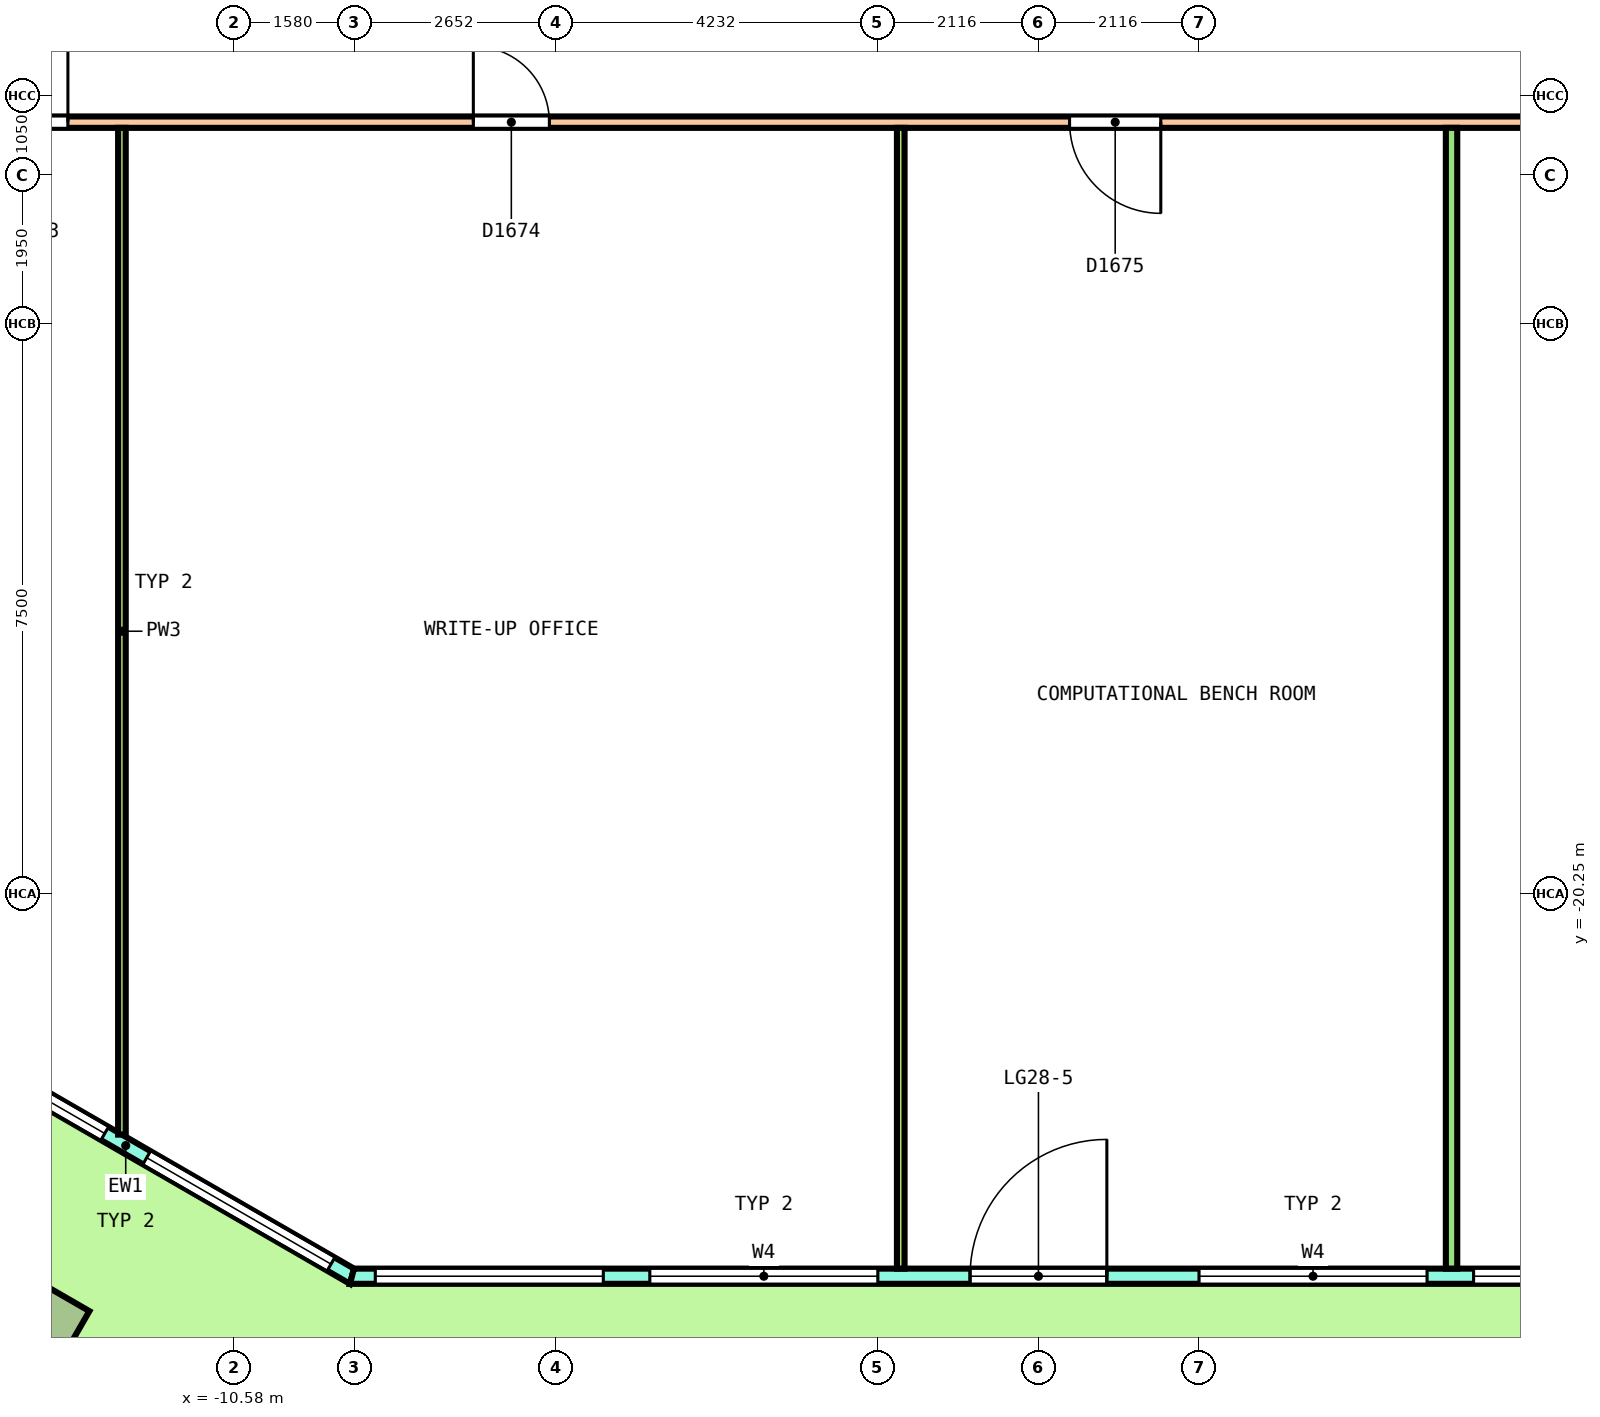
"""IFC4 building model, lengths in metres.
Left out: names, types, materials, properties, quantities, classifications, styles, units other than length and angle.
Written with IfcOpenShell. Run it as: python <this file> out.ifc"""

import sys

from ifc_helpers import new_model, si_unit, direction, frame, frame_2d, origin, origin_2d, place, context, subcontext, project, spatial, polyline, rectangle, outline, extrude, element, fill, save


model = new_model("IFC4")
c1 = context("Model", 3, precision=1e-05, world=origin(), true_north=direction((0.0, 1.0)))
c2 = subcontext(c1, "Body", "Model", "MODEL_VIEW")
j1 = project(units=[si_unit("LENGTHUNIT", "METRE"), si_unit("PLANEANGLEUNIT", "RADIAN")], contexts=[c1])
p1 = place(None, origin())
s1 = spatial("IfcSite", under=j1, at=p1, CompositionType="ELEMENT")
p2 = place(p1, origin())
s2 = spatial("IfcBuilding", under=s1, at=p2, CompositionType="ELEMENT")
p3 = place(p2, frame((0.0, 0.0, 130.8)))
s3 = spatial("IfcBuildingStorey", under=s2, at=p3, CompositionType="ELEMENT", Elevation=130.8)
p4 = place(p3, frame((-13.408, -25.989, 0.0), z_axis=(0.0, 0.0, 1.0), x_axis=(0.866025403784, -0.5, 0.0)))
e1 = element("IfcColumn", 1, at=p4, inside=s3, PredefinedType="COLUMN", context=c2, shape_type="SweptSolid", body=[
    extrude(rectangle(XDim=1.35, YDim=1.35, at=origin_2d()), origin(), (0.0, 0.0, 1.0), 4.04),
])
p5 = place(p3, frame((-14.985, -21.845, 0.0), z_axis=(0.0, 0.0, 1.0), x_axis=(0.866029458321, -0.49999297727, 0.0)))
e2 = element("IfcWall", 2, at=p5, inside=s3, PredefinedType="SOLIDWALL", context=c2, shape_type="SweptSolid", body=[
    extrude(outline(polyline([(-0.027, -0.1), (1.128, -0.1), (2.282, -0.1), (3.437, -0.1), (4.592, -0.1), (5.747, -0.1), (6.901, -0.1), (6.848, 0.1), (5.711, 0.1), (4.574, 0.1), (3.437, 0.1), (2.301, 0.1), (1.164, 0.1), (0.027, 0.1), (-0.027, -0.1)])), origin(), (0.0, 0.0, 1.0), 4.1),
])
p6 = place(p5, frame((0.319, 0.0, 0.1)))
e3 = element("IfcOpeningElement", 3, at=p6, cuts=e2, PredefinedType="OPENING", context=c2, shape_type="SweptSolid", body=[
    extrude(rectangle(XDim=2.8, YDim=2.9, at=frame_2d((1.4, 1.45))), frame((0.0, 0.11, 0.0), z_axis=(0.0, -1.0, 0.0), x_axis=(1.0, 0.0, 0.0)), (0.0, 0.0, 1.0), 0.22),
])
p7 = place(p5, frame((3.756, 0.0, 0.1)))
e4 = element("IfcOpeningElement", 4, at=p7, cuts=e2, PredefinedType="OPENING", context=c2, shape_type="SweptSolid", body=[
    extrude(rectangle(XDim=2.8, YDim=2.9, at=frame_2d((1.4, 1.45))), frame((0.0, 0.11, 0.0), z_axis=(0.0, -1.0, 0.0), x_axis=(1.0, 0.0, 0.0)), (0.0, 0.0, 1.0), 0.22),
])
p8 = place(p3, frame((-9.031, -25.283, 0.0), z_axis=(0.0, 0.0, 1.0), x_axis=(1.0, 0.0, 0.0)))
e5 = element("IfcWall", 5, at=p8, inside=s3, PredefinedType="SOLIDWALL", context=c2, shape_type="SweptSolid", body=[
    extrude(outline(polyline([(-0.027, -0.1), (0.979, -0.1), (1.986, -0.1), (2.992, -0.1), (3.999, -0.1), (5.005, -0.1), (6.012, -0.1), (7.018, -0.1), (8.025, -0.1), (9.031, -0.1), (10.038, -0.1), (11.044, -0.1), (12.051, -0.1), (13.057, -0.1), (14.063, -0.1), (15.07, -0.1), (16.076, -0.1), (17.083, -0.1), (18.089, -0.1), (18.036, 0.1), (17.035, 0.1), (16.035, 0.1), (15.034, 0.1), (14.034, 0.1), (13.033, 0.1), (12.033, 0.1), (11.032, 0.1), (10.032, 0.1), (9.031, 0.1), (8.031, 0.1), (7.03, 0.1), (6.03, 0.1), (5.029, 0.1), (4.029, 0.1), (3.028, 0.1), (2.028, 0.1), (1.027, 0.1), (0.027, 0.1), (-0.027, -0.1)])), origin(), (0.0, 0.0, 1.0), 4.1),
])
p9 = place(p8, frame((0.306, 0.0, 0.1)))
e6 = element("IfcOpeningElement", 6, at=p9, cuts=e5, PredefinedType="OPENING", context=c2, shape_type="SweptSolid", body=[
    extrude(rectangle(XDim=3.0, YDim=2.9, at=frame_2d((1.5, 1.45))), frame((0.0, 0.11, 0.0), z_axis=(0.0, -1.0, 0.0), x_axis=(1.0, 0.0, 0.0)), (0.0, 0.0, 1.0), 0.22),
])
p10 = place(p8, frame((3.919, 0.0, 0.1)))
e7 = element("IfcOpeningElement", 7, at=p10, cuts=e5, PredefinedType="OPENING", context=c2, shape_type="SweptSolid", body=[
    extrude(rectangle(XDim=3.0, YDim=2.9, at=frame_2d((1.5, 1.45))), frame((0.0, 0.11, 0.0), z_axis=(0.0, -1.0, 0.0), x_axis=(1.0, 0.0, 0.0)), (0.0, 0.0, 1.0), 0.22),
])
p11 = place(p8, frame((8.131, 0.0, 0.0)))
e8 = element("IfcOpeningElement", 8, at=p11, cuts=e5, PredefinedType="OPENING", context=c2, shape_type="SweptSolid", body=[
    extrude(rectangle(XDim=1.8, YDim=2.4, at=frame_2d((0.9, 1.2))), frame((0.0, 0.11, 0.0), z_axis=(0.0, -1.0, 0.0), x_axis=(1.0, 0.0, 0.0)), (0.0, 0.0, 1.0), 0.22),
])
p12 = place(p8, frame((8.131, 0.0, 2.55)))
e9 = element("IfcOpeningElement", 9, at=p12, cuts=e5, PredefinedType="OPENING", context=c2, shape_type="SweptSolid", body=[
    extrude(rectangle(XDim=1.8, YDim=0.45, at=frame_2d((0.9, 0.225))), frame((0.0, 0.11, 0.0), z_axis=(0.0, -1.0, 0.0), x_axis=(1.0, 0.0, 0.0)), (0.0, 0.0, 1.0), 0.22),
])
p13 = place(p8, frame((11.144, 0.0, 0.1)))
e10 = element("IfcOpeningElement", 10, at=p13, cuts=e5, PredefinedType="OPENING", context=c2, shape_type="SweptSolid", body=[
    extrude(rectangle(XDim=3.0, YDim=2.9, at=frame_2d((1.5, 1.45))), frame((0.0, 0.11, 0.0), z_axis=(0.0, -1.0, 0.0), x_axis=(1.0, 0.0, 0.0)), (0.0, 0.0, 1.0), 0.22),
])
p14 = place(p8, frame((14.756, 0.0, 0.1)))
e11 = element("IfcOpeningElement", 11, at=p14, cuts=e5, PredefinedType="OPENING", context=c2, shape_type="SweptSolid", body=[
    extrude(rectangle(XDim=3.0, YDim=2.9, at=frame_2d((1.5, 1.45))), frame((0.0, 0.11, 0.0), z_axis=(0.0, -1.0, 0.0), x_axis=(1.0, 0.0, 0.0)), (0.0, 0.0, 1.0), 0.22),
])
p15 = place(p3, frame((-15.275, -10.1, 0.0), z_axis=(0.0, 0.0, 1.0), x_axis=(1.0, 0.0, 0.0)))
e12 = element("IfcWall", 12, at=p15, inside=s3, PredefinedType="PARTITIONING", context=c2, shape_type="SweptSolid", body=[
    extrude(rectangle(XDim=30.4, YDim=0.15, at=frame_2d((15.2, 0.0))), origin(), (0.0, 0.0, 1.0), 3.05),
])
p16 = place(p15, frame((1.506, 0.0, 0.0)))
e13 = element("IfcOpeningElement", 13, at=p16, cuts=e12, PredefinedType="OPENING", context=c2, shape_type="SweptSolid", body=[
    extrude(rectangle(XDim=1.0, YDim=2.1, at=frame_2d((0.5, 1.05))), frame((0.0, 0.085, 0.0), z_axis=(0.0, -1.0, 0.0), x_axis=(1.0, 0.0, 0.0)), (0.0, 0.0, 1.0), 0.17),
])
p17 = place(p15, frame((7.84, 0.0, 0.0)))
e14 = element("IfcOpeningElement", 14, at=p17, cuts=e12, PredefinedType="OPENING", context=c2, shape_type="SweptSolid", body=[
    extrude(rectangle(XDim=1.0, YDim=2.1, at=frame_2d((0.5, 1.05))), frame((0.0, 0.085, 0.0), z_axis=(0.0, -1.0, 0.0), x_axis=(1.0, 0.0, 0.0)), (0.0, 0.0, 1.0), 0.17),
])
p18 = place(p15, frame((15.685, 0.0, 0.0)))
e15 = element("IfcOpeningElement", 15, at=p18, cuts=e12, PredefinedType="OPENING", context=c2, shape_type="SweptSolid", body=[
    extrude(rectangle(XDim=1.2, YDim=2.1, at=frame_2d((0.6, 1.05))), frame((0.0, 0.085, 0.0), z_axis=(0.0, -1.0, 0.0), x_axis=(1.0, 0.0, 0.0)), (0.0, 0.0, 1.0), 0.17),
])
p19 = place(p15, frame((23.812, 0.0, 0.0)))
e16 = element("IfcOpeningElement", 16, at=p19, cuts=e12, PredefinedType="OPENING", context=c2, shape_type="SweptSolid", body=[
    extrude(rectangle(XDim=1.2, YDim=2.1, at=frame_2d((0.6, 1.05))), frame((0.0, 0.085, 0.0), z_axis=(0.0, -1.0, 0.0), x_axis=(1.0, 0.0, 0.0)), (0.0, 0.0, 1.0), 0.17),
])
p20 = place(p3, frame((5.435, -25.183, 0.0), z_axis=(0.0, 0.0, 1.0), x_axis=(0.0, 1.0, 0.0)))
e17 = element("IfcWall", 17, at=p20, inside=s3, PredefinedType="PARTITIONING", context=c2, shape_type="SweptSolid", body=[
    extrude(rectangle(XDim=15.008, YDim=0.15, at=frame_2d((7.504, 0.0))), origin(), (0.0, 0.0, 1.0), 3.05),
])
p21 = place(p3, frame((-12.058, -23.42, 0.0), z_axis=(0.0, 0.0, 1.0), x_axis=(0.0, 1.0, 0.0)))
e18 = element("IfcWall", 18, at=p21, inside=s3, PredefinedType="PARTITIONING", context=c2, shape_type="SweptSolid", body=[
    extrude(rectangle(XDim=13.245, YDim=0.1, at=frame_2d((6.623, 0.0))), origin(), (0.0, 0.0, 1.0), 3.05),
])
p22 = place(p3, frame((-1.812, -25.183, 0.0), z_axis=(0.0, 0.0, 1.0), x_axis=(0.0, 1.0, 0.0)))
e19 = element("IfcWall", 19, at=p22, inside=s3, PredefinedType="PARTITIONING", context=c2, shape_type="SweptSolid", body=[
    extrude(rectangle(XDim=15.008, YDim=0.1, at=frame_2d((7.504, 0.0))), origin(), (0.0, 0.0, 1.0), 3.05),
])
p23 = place(p6, origin())
e20 = element("IfcWindow", 20, at=p23, inside=s3, PartitioningType="SINGLE_PANEL", PredefinedType="WINDOW", context=c2, shape_type="SweptSolid", body=[
    extrude(rectangle(XDim=2.8, YDim=2.9, at=frame_2d((1.4, 1.45))), frame((0.0, 0.03, 0.0), z_axis=(0.0, -1.0, 0.0), x_axis=(1.0, 0.0, 0.0)), (0.0, 0.0, 1.0), 0.06),
])
fill(e3, e20)
p24 = place(p7, origin())
e21 = element("IfcWindow", 21, at=p24, inside=s3, PartitioningType="SINGLE_PANEL", PredefinedType="WINDOW", context=c2, shape_type="SweptSolid", body=[
    extrude(rectangle(XDim=2.8, YDim=2.9, at=frame_2d((1.4, 1.45))), frame((0.0, 0.03, 0.0), z_axis=(0.0, -1.0, 0.0), x_axis=(1.0, 0.0, 0.0)), (0.0, 0.0, 1.0), 0.06),
])
fill(e4, e21)
p25 = place(p9, origin())
e22 = element("IfcWindow", 22, at=p25, inside=s3, PartitioningType="SINGLE_PANEL", PredefinedType="WINDOW", context=c2, shape_type="SweptSolid", body=[
    extrude(rectangle(XDim=3.0, YDim=2.9, at=frame_2d((1.5, 1.45))), frame((0.0, 0.03, 0.0), z_axis=(0.0, -1.0, 0.0), x_axis=(1.0, 0.0, 0.0)), (0.0, 0.0, 1.0), 0.06),
])
fill(e6, e22)
p26 = place(p10, origin())
e23 = element("IfcWindow", 23, at=p26, inside=s3, PartitioningType="SINGLE_PANEL", PredefinedType="WINDOW", context=c2, shape_type="SweptSolid", body=[
    extrude(rectangle(XDim=3.0, YDim=2.9, at=frame_2d((1.5, 1.45))), frame((0.0, 0.03, 0.0), z_axis=(0.0, -1.0, 0.0), x_axis=(1.0, 0.0, 0.0)), (0.0, 0.0, 1.0), 0.06),
])
fill(e7, e23)
p27 = place(p11, origin())
e24 = element("IfcDoor", 24, at=p27, inside=s3, OperationType="DOUBLE_DOOR_SINGLE_SWING", PredefinedType="DOOR", context=c2, shape_type="SweptSolid", body=[
    extrude(rectangle(XDim=1.8, YDim=2.4, at=frame_2d((0.9, 1.2))), frame((0.0, 0.025, 0.0), z_axis=(0.0, -1.0, 0.0), x_axis=(1.0, 0.0, 0.0)), (0.0, 0.0, 1.0), 0.05),
])
fill(e8, e24)
p28 = place(p12, origin())
e25 = element("IfcWindow", 25, at=p28, inside=s3, PartitioningType="SINGLE_PANEL", PredefinedType="WINDOW", context=c2, shape_type="SweptSolid", body=[
    extrude(rectangle(XDim=1.8, YDim=0.45, at=frame_2d((0.9, 0.225))), frame((0.0, 0.03, 0.0), z_axis=(0.0, -1.0, 0.0), x_axis=(1.0, 0.0, 0.0)), (0.0, 0.0, 1.0), 0.06),
])
fill(e9, e25)
p29 = place(p13, origin())
e26 = element("IfcWindow", 26, at=p29, inside=s3, PartitioningType="SINGLE_PANEL", PredefinedType="WINDOW", context=c2, shape_type="SweptSolid", body=[
    extrude(rectangle(XDim=3.0, YDim=2.9, at=frame_2d((1.5, 1.45))), frame((0.0, 0.03, 0.0), z_axis=(0.0, -1.0, 0.0), x_axis=(1.0, 0.0, 0.0)), (0.0, 0.0, 1.0), 0.06),
])
fill(e10, e26)
p30 = place(p14, origin())
e27 = element("IfcWindow", 27, at=p30, inside=s3, PartitioningType="SINGLE_PANEL", PredefinedType="WINDOW", context=c2, shape_type="SweptSolid", body=[
    extrude(rectangle(XDim=3.0, YDim=2.9, at=frame_2d((1.5, 1.45))), frame((0.0, 0.03, 0.0), z_axis=(0.0, -1.0, 0.0), x_axis=(1.0, 0.0, 0.0)), (0.0, 0.0, 1.0), 0.06),
])
fill(e11, e27)
p31 = place(p16, origin())
e28 = element("IfcDoor", 28, at=p31, inside=s3, OperationType="SINGLE_SWING_RIGHT", PredefinedType="DOOR", context=c2, shape_type="SweptSolid", body=[
    extrude(rectangle(XDim=1.0, YDim=2.1, at=frame_2d((0.5, 1.05))), frame((0.0, 0.025, 0.0), z_axis=(0.0, -1.0, 0.0), x_axis=(1.0, 0.0, 0.0)), (0.0, 0.0, 1.0), 0.05),
])
fill(e13, e28)
p32 = place(p17, origin())
e29 = element("IfcDoor", 29, at=p32, inside=s3, OperationType="SINGLE_SWING_LEFT", PredefinedType="DOOR", context=c2, shape_type="SweptSolid", body=[
    extrude(rectangle(XDim=1.0, YDim=2.1, at=frame_2d((0.5, 1.05))), frame((0.0, 0.025, 0.0), z_axis=(0.0, -1.0, 0.0), x_axis=(1.0, 0.0, 0.0)), (0.0, 0.0, 1.0), 0.05),
])
fill(e14, e29)
p33 = place(p18, origin())
e30 = element("IfcDoor", 30, at=p33, inside=s3, OperationType="DOUBLE_DOOR_SINGLE_SWING", PredefinedType="DOOR", context=c2, shape_type="SweptSolid", body=[
    extrude(rectangle(XDim=1.2, YDim=2.1, at=frame_2d((0.6, 1.05))), frame((0.0, 0.025, 0.0), z_axis=(0.0, -1.0, 0.0), x_axis=(1.0, 0.0, 0.0)), (0.0, 0.0, 1.0), 0.05),
])
fill(e15, e30)
save(model, sys.argv[1])
